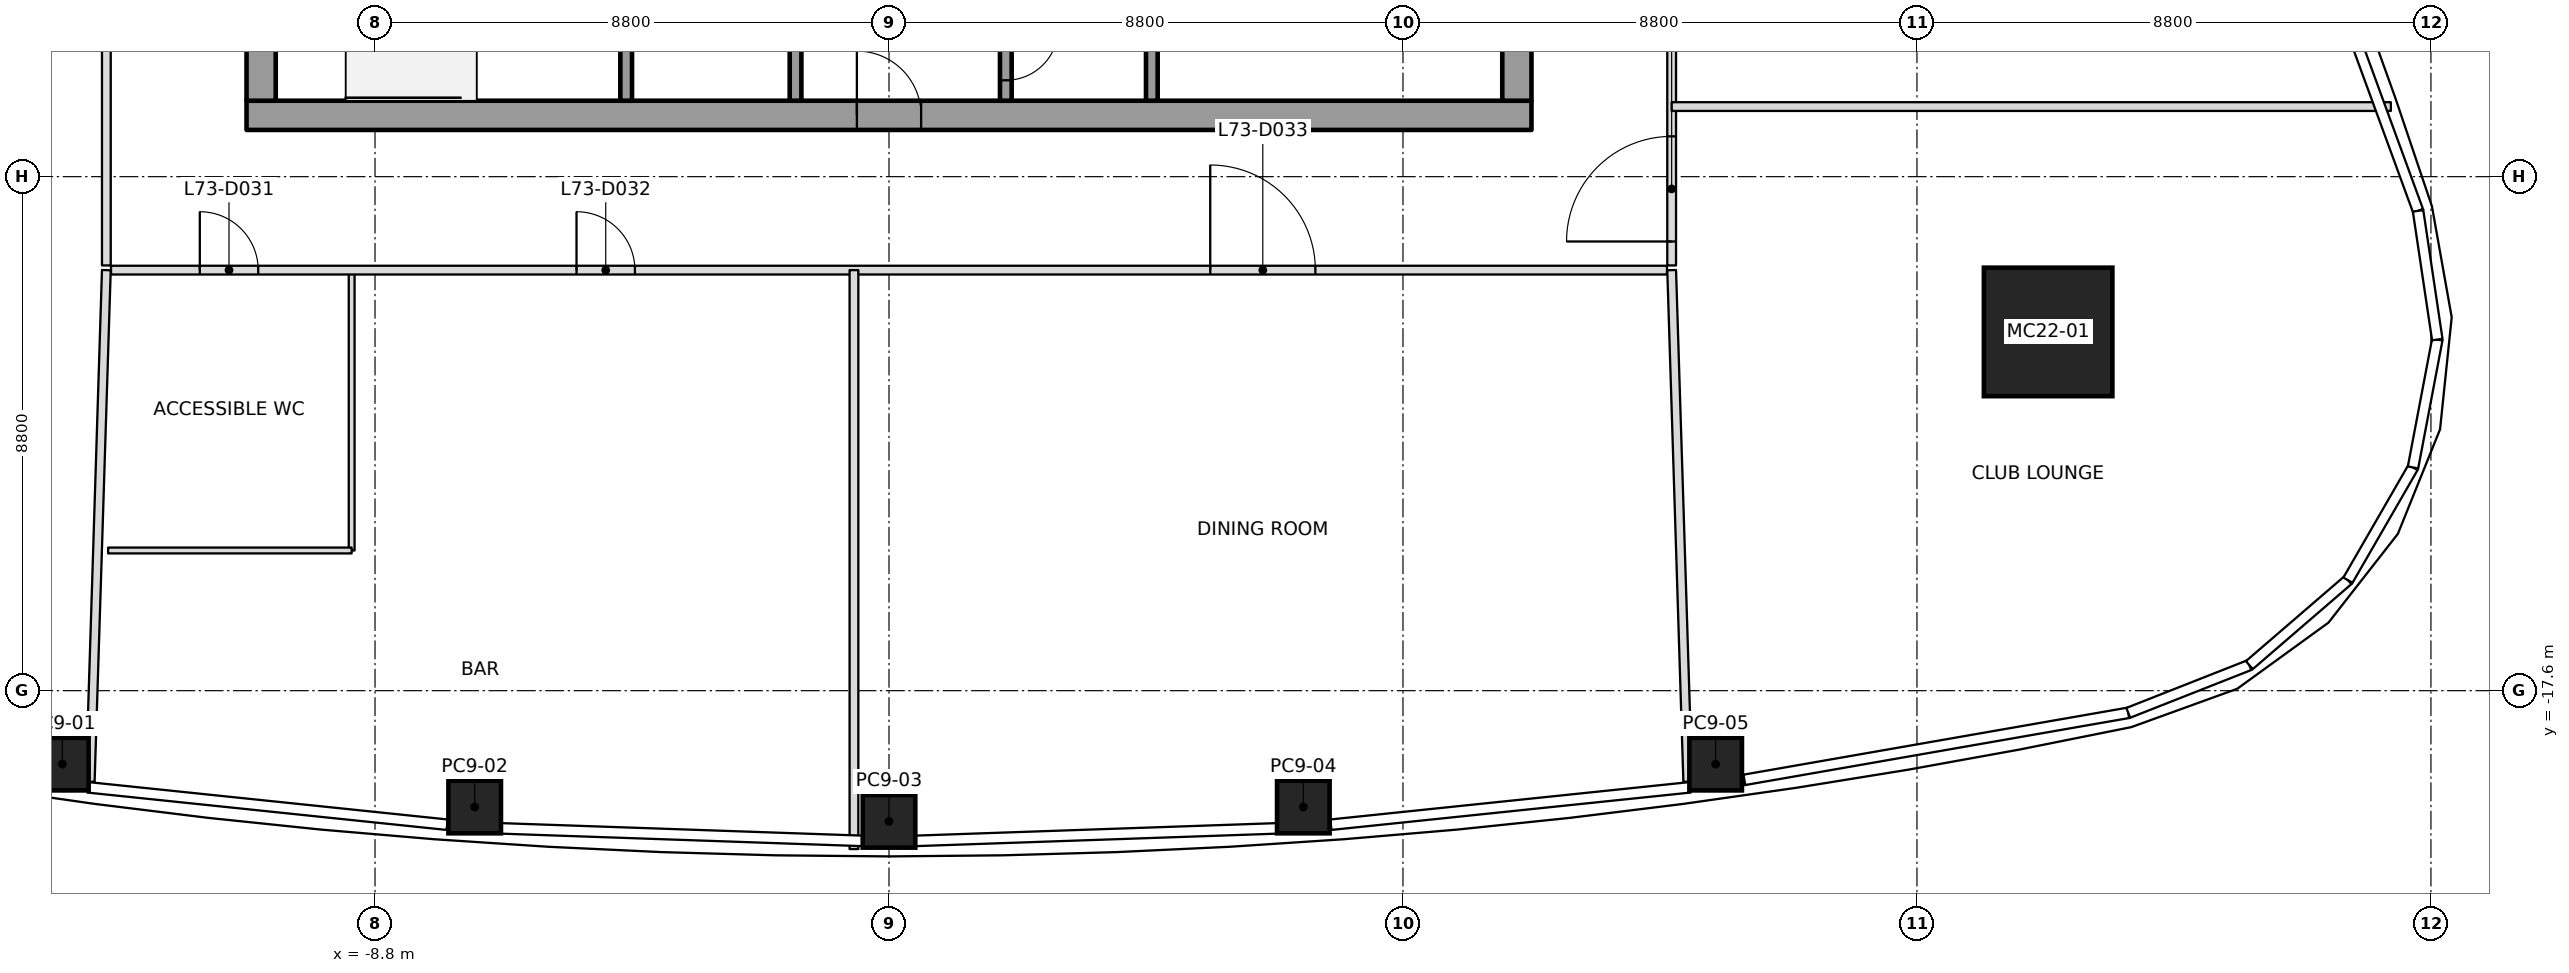
"""IFC4 building model, lengths in metres.
Left out: names, types, materials, properties, quantities, classifications, styles, units other than length and angle.
Written with IfcOpenShell. Run it as: python <this file> out.ifc"""

import sys

from ifc_helpers import new_model, si_unit, direction, frame, frame_2d, origin, origin_2d, place, context, subcontext, project, spatial, rectangle, extrude, clip, halfspace, element, fill, save


model = new_model("IFC4")
c1 = context("Model", 3, precision=1e-05, world=origin(), true_north=direction((0.0, 1.0)))
c2 = subcontext(c1, "Body", "Model", "MODEL_VIEW")
j1 = project(units=[si_unit("LENGTHUNIT", "METRE"), si_unit("PLANEANGLEUNIT", "RADIAN")], contexts=[c1])
p1 = place(None, origin())
s1 = spatial("IfcSite", under=j1, at=p1, CompositionType="ELEMENT")
p2 = place(p1, origin())
s2 = spatial("IfcBuilding", under=s1, at=p2, CompositionType="ELEMENT")
p3 = place(p2, frame((0.0, 0.0, 319.0)))
s3 = spatial("IfcBuildingStorey", under=s2, at=p3, CompositionType="ELEMENT", Elevation=319.0)
p4 = place(p3, frame((19.846, -11.458, 0.0), z_axis=(-0.020475326005, 0.011842241531, 0.999720222032), x_axis=(0.999790358538, 0.000242524599, 0.020473889636)))
e1 = element("IfcColumn", 1, at=p4, inside=s3, PredefinedType="COLUMN", context=c2, shape_type="SweptSolid", body=[
    clip(clip(extrude(rectangle(XDim=2.2, YDim=2.2, at=origin_2d()), origin(), (0.0, 0.0, 1.0), 5.401), halfspace(frame((0.0, 0.0, 0.007)), True)), halfspace(frame((0.0, 0.0, 5.4)), False)),
])
p5 = place(p3, frame((-14.154, -18.857, 0.0), z_axis=(0.012929182019, 0.007685178123, 0.999886880747), x_axis=(-0.990378637615, 0.137884644373, 0.01174644637)))
e2 = element("IfcColumn", 2, at=p5, inside=s3, PredefinedType="COLUMN", context=c2, shape_type="SweptSolid", body=[
    clip(clip(extrude(rectangle(XDim=0.9, YDim=0.9, at=origin_2d()), origin(), (0.0, 0.0, 1.0), 5.401), halfspace(frame((0.0, 0.0, 0.002)), True)), halfspace(frame((0.0, 0.0, 5.4)), False)),
])
p6 = place(p3, frame((-7.094, -19.592, 0.0), z_axis=(0.006464968382, 0.008228141577, 0.999945249436), x_axis=(-0.997591658129, 0.069110756598, 0.00588106743)))
e3 = element("IfcColumn", 3, at=p6, inside=s3, PredefinedType="COLUMN", context=c2, shape_type="SweptSolid", body=[
    clip(clip(extrude(rectangle(XDim=0.9, YDim=0.9, at=origin_2d()), origin(), (0.0, 0.0, 1.0), 5.4), halfspace(frame((0.0, 0.0, 0.001)), True)), halfspace(frame((0.0, 0.0, 5.4)), False)),
])
p7 = place(p3, frame((0.0, -19.837, 0.0), z_axis=(0.0, 0.008454350161, 0.999964261343), x_axis=(1.0, 0.0, 0.0)))
e4 = element("IfcColumn", 4, at=p7, inside=s3, PredefinedType="COLUMN", context=c2, shape_type="SweptSolid", body=[
    clip(extrude(rectangle(XDim=0.9, YDim=0.9, at=origin_2d()), origin(), (0.0, 0.0, 1.0), 5.4), halfspace(frame((0.0, 0.0, 0.001)), True)),
])
p8 = place(p3, frame((7.094, -19.592, 0.0), z_axis=(-0.006464968382, 0.008228141577, 0.999945249436), x_axis=(0.997591658129, 0.069110756598, 0.00588106743)))
e5 = element("IfcColumn", 5, at=p8, inside=s3, PredefinedType="COLUMN", context=c2, shape_type="SweptSolid", body=[
    clip(clip(extrude(rectangle(XDim=0.9, YDim=0.9, at=origin_2d()), origin(), (0.0, 0.0, 1.0), 5.4), halfspace(frame((0.0, 0.0, 0.001)), True)), halfspace(frame((0.0, 0.0, 5.4)), False)),
])
p9 = place(p3, frame((14.154, -18.857, 0.0), z_axis=(-0.012929182019, 0.007685178123, 0.999886880747), x_axis=(0.990378637615, 0.137884644373, 0.01174644637)))
e6 = element("IfcColumn", 6, at=p9, inside=s3, PredefinedType="COLUMN", context=c2, shape_type="SweptSolid", body=[
    clip(clip(extrude(rectangle(XDim=0.9, YDim=0.9, at=origin_2d()), origin(), (0.0, 0.0, 1.0), 5.401), halfspace(frame((0.0, 0.0, 0.002)), True)), halfspace(frame((0.0, 0.0, 5.4)), False)),
])
p10 = place(p3, frame((-11.0, -7.75, 0.0), z_axis=(0.0, 0.0, 1.0), x_axis=(1.0, 0.0, 0.0)))
e7 = element("IfcWall", 7, at=p10, inside=s3, PredefinedType="SHEAR", context=c2, shape_type="SweptSolid", body=[
    extrude(rectangle(XDim=22.0, YDim=0.5, at=frame_2d((11.0, 0.0))), origin(), (0.0, 0.0, 1.0), 5.4),
])
p11 = place(p10, frame((10.45, 0.0, 0.0)))
e8 = element("IfcOpeningElement", 8, at=p11, cuts=e7, PredefinedType="OPENING", context=c2, shape_type="SweptSolid", body=[
    extrude(rectangle(XDim=1.1, YDim=2.1, at=frame_2d((0.55, 1.05))), frame((0.0, 0.25, 0.0), z_axis=(0.0, -1.0, 0.0), x_axis=(1.0, 0.0, 0.0)), (0.0, 0.0, 1.0), 0.5),
])
p12 = place(p3, frame((-10.75, -7.5, 0.0), z_axis=(0.0, 0.0, 1.0), x_axis=(0.0, 1.0, 0.0)))
e9 = element("IfcWall", 9, at=p12, inside=s3, PredefinedType="SHEAR", context=c2, shape_type="SweptSolid", body=[
    extrude(rectangle(XDim=15.0, YDim=0.5, at=frame_2d((7.5, 0.0))), origin(), (0.0, 0.0, 1.0), 5.4),
])
p13 = place(p12, frame((6.6, 0.0, 0.0)))
e10 = element("IfcOpeningElement", 10, at=p13, cuts=e9, PredefinedType="OPENING", context=c2, shape_type="SweptSolid", body=[
    extrude(rectangle(XDim=1.8, YDim=2.1, at=frame_2d((0.9, 1.05))), frame((0.0, 0.25, 0.0), z_axis=(0.0, -1.0, 0.0), x_axis=(1.0, 0.0, 0.0)), (0.0, 0.0, 1.0), 0.5),
])
p14 = place(p3, frame((10.75, -7.5, 0.0), z_axis=(0.0, 0.0, 1.0), x_axis=(0.0, 1.0, 0.0)))
e11 = element("IfcWall", 11, at=p14, inside=s3, PredefinedType="SHEAR", context=c2, shape_type="SweptSolid", body=[
    extrude(rectangle(XDim=15.0, YDim=0.5, at=frame_2d((7.5, 0.0))), origin(), (0.0, 0.0, 1.0), 5.4),
])
p15 = place(p14, frame((6.6, 0.0, 0.0)))
e12 = element("IfcOpeningElement", 12, at=p15, cuts=e11, PredefinedType="OPENING", context=c2, shape_type="SweptSolid", body=[
    extrude(rectangle(XDim=1.8, YDim=2.1, at=frame_2d((0.9, 1.05))), frame((0.0, 0.25, 0.0), z_axis=(0.0, -1.0, 0.0), x_axis=(1.0, 0.0, 0.0)), (0.0, 0.0, 1.0), 0.5),
])
p16 = place(p3, frame((-4.5, -4.6, 0.0), z_axis=(0.0, 0.0, 1.0), x_axis=(0.0, -1.0, 0.0)))
e13 = element("IfcWall", 13, at=p16, inside=s3, PredefinedType="SOLIDWALL", context=c2, shape_type="SweptSolid", body=[
    extrude(rectangle(XDim=2.9, YDim=0.2, at=frame_2d((1.45, 0.0))), origin(), (0.0, 0.0, 1.0), 5.25),
])
p17 = place(p3, frame((-1.6, -7.5, 0.0), z_axis=(0.0, 0.0, 1.0), x_axis=(0.0, 1.0, 0.0)))
e14 = element("IfcWall", 14, at=p17, inside=s3, PredefinedType="SOLIDWALL", context=c2, shape_type="SweptSolid", body=[
    extrude(rectangle(XDim=2.9, YDim=0.2, at=frame_2d((1.45, 0.0))), origin(), (0.0, 0.0, 1.0), 5.25),
])
p18 = place(p17, frame((0.9, 0.0, 0.0)))
e15 = element("IfcOpeningElement", 15, at=p18, cuts=e14, PredefinedType="OPENING", context=c2, shape_type="SweptSolid", body=[
    extrude(rectangle(XDim=1.1, YDim=2.1, at=frame_2d((0.55, 1.05))), frame((0.0, 0.1, 0.0), z_axis=(0.0, -1.0, 0.0), x_axis=(1.0, 0.0, 0.0)), (0.0, 0.0, 1.0), 0.2),
])
p19 = place(p3, frame((2.0, -5.9, 0.0), z_axis=(0.0, 0.0, 1.0), x_axis=(0.0, -1.0, 0.0)))
e16 = element("IfcWall", 16, at=p19, inside=s3, PredefinedType="SOLIDWALL", context=c2, shape_type="SweptSolid", body=[
    extrude(rectangle(XDim=1.6, YDim=0.2, at=frame_2d((0.8, 0.0))), origin(), (0.0, 0.0, 1.0), 5.25),
])
p20 = place(p19, frame((0.35, 0.0, 0.0)))
e17 = element("IfcOpeningElement", 17, at=p20, cuts=e16, PredefinedType="OPENING", context=c2, shape_type="SweptSolid", body=[
    extrude(rectangle(XDim=0.9, YDim=2.1, at=frame_2d((0.45, 1.05))), frame((0.0, 0.1, 0.0), z_axis=(0.0, -1.0, 0.0), x_axis=(1.0, 0.0, 0.0)), (0.0, 0.0, 1.0), 0.2),
])
p21 = place(p3, frame((4.5, -5.9, 0.0), z_axis=(0.0, 0.0, 1.0), x_axis=(0.0, -1.0, 0.0)))
e18 = element("IfcWall", 18, at=p21, inside=s3, PredefinedType="SOLIDWALL", context=c2, shape_type="SweptSolid", body=[
    extrude(rectangle(XDim=1.6, YDim=0.2, at=frame_2d((0.8, 0.0))), origin(), (0.0, 0.0, 1.0), 5.25),
])
p22 = place(p3, frame((-13.4, -10.4, 0.0), z_axis=(0.0, 0.0, 1.0), x_axis=(-0.031481767442, -0.999504326313, 0.0)))
e19 = element("IfcWall", 19, at=p22, inside=s3, PredefinedType="PARTITIONING", context=c2, shape_type="SweptSolid", body=[
    extrude(rectangle(XDim=8.763, YDim=0.15, at=frame_2d((4.382, 0.0))), origin(), (0.0, 0.0, 1.0), 4.533),
])
p23 = place(p3, frame((-0.6, -10.4, 0.0), z_axis=(0.0, 0.0, 1.0), x_axis=(0.0, -1.0, 0.0)))
e20 = element("IfcWall", 20, at=p23, inside=s3, PredefinedType="PARTITIONING", context=c2, shape_type="SweptSolid", body=[
    extrude(rectangle(XDim=9.912, YDim=0.15, at=frame_2d((4.956, 0.0))), origin(), (0.0, 0.0, 1.0), 4.533),
])
p24 = place(p3, frame((13.4, -10.4, 0.0), z_axis=(0.0, 0.0, 1.0), x_axis=(0.031481767442, -0.999504326313, 0.0)))
e21 = element("IfcWall", 21, at=p24, inside=s3, PredefinedType="PARTITIONING", context=c2, shape_type="SweptSolid", body=[
    extrude(rectangle(XDim=8.763, YDim=0.15, at=frame_2d((4.382, 0.0))), origin(), (0.0, 0.0, 1.0), 4.533),
])
p25 = place(p3, frame((13.4, -7.6, 0.0), z_axis=(0.0, 0.0, 1.0), x_axis=(1.0, 0.0, 0.0)))
e22 = element("IfcWall", 22, at=p25, inside=s3, PredefinedType="PARTITIONING", context=c2, shape_type="SweptSolid", body=[
    extrude(rectangle(XDim=12.314, YDim=0.15, at=frame_2d((6.157, 0.0))), origin(), (0.0, 0.0, 1.0), 4.533),
])
p26 = place(p3, frame((-13.4, 10.32, 0.0), z_axis=(0.0, 0.0, 1.0), x_axis=(0.0, -1.0, 0.0)))
e23 = element("IfcWall", 23, at=p26, inside=s3, PredefinedType="PARTITIONING", context=c2, shape_type="SweptSolid", body=[
    extrude(rectangle(XDim=20.64, YDim=0.15, at=frame_2d((10.32, 0.0))), origin(), (0.0, 0.0, 1.0), 4.538),
])
p27 = place(p26, frame((9.83, 0.0, 0.0)))
e24 = element("IfcOpeningElement", 24, at=p27, cuts=e23, PredefinedType="OPENING", context=c2, shape_type="SweptSolid", body=[
    extrude(rectangle(XDim=1.0, YDim=2.1, at=frame_2d((0.5, 1.05))), frame((0.0, 0.075, 0.0), z_axis=(0.0, -1.0, 0.0), x_axis=(1.0, 0.0, 0.0)), (0.0, 0.0, 1.0), 0.15),
])
p28 = place(p3, frame((-13.32, -10.4, 0.0), z_axis=(0.0, 0.0, 1.0), x_axis=(1.0, 0.0, 0.0)))
e25 = element("IfcWall", 25, at=p28, inside=s3, PredefinedType="PARTITIONING", context=c2, shape_type="SweptSolid", body=[
    extrude(rectangle(XDim=26.64, YDim=0.15, at=frame_2d((13.32, 0.0))), origin(), (0.0, 0.0, 1.0), 4.606),
])
p29 = place(p28, frame((1.52, 0.0, 0.0)))
e26 = element("IfcOpeningElement", 26, at=p29, cuts=e25, PredefinedType="OPENING", context=c2, shape_type="SweptSolid", body=[
    extrude(rectangle(XDim=1.0, YDim=2.1, at=frame_2d((0.5, 1.05))), frame((0.0, 0.075, 0.0), z_axis=(0.0, -1.0, 0.0), x_axis=(1.0, 0.0, 0.0)), (0.0, 0.0, 1.0), 0.15),
])
p30 = place(p28, frame((7.97, 0.0, 0.0)))
e27 = element("IfcOpeningElement", 27, at=p30, cuts=e25, PredefinedType="OPENING", context=c2, shape_type="SweptSolid", body=[
    extrude(rectangle(XDim=1.0, YDim=2.1, at=frame_2d((0.5, 1.05))), frame((0.0, 0.075, 0.0), z_axis=(0.0, -1.0, 0.0), x_axis=(1.0, 0.0, 0.0)), (0.0, 0.0, 1.0), 0.15),
])
p31 = place(p28, frame((18.82, 0.0, 0.0)))
e28 = element("IfcOpeningElement", 28, at=p31, cuts=e25, PredefinedType="OPENING", context=c2, shape_type="SweptSolid", body=[
    extrude(rectangle(XDim=1.8, YDim=2.1, at=frame_2d((0.9, 1.05))), frame((0.0, 0.075, 0.0), z_axis=(0.0, -1.0, 0.0), x_axis=(1.0, 0.0, 0.0)), (0.0, 0.0, 1.0), 0.15),
])
p32 = place(p3, frame((13.4, -10.32, 0.0), z_axis=(0.0, 0.0, 1.0), x_axis=(0.0, 1.0, 0.0)))
e29 = element("IfcWall", 29, at=p32, inside=s3, PredefinedType="PARTITIONING", context=c2, shape_type="SweptSolid", body=[
    extrude(rectangle(XDim=20.64, YDim=0.15, at=frame_2d((10.32, 0.0))), origin(), (0.0, 0.0, 1.0), 4.538),
])
p33 = place(p32, frame((0.41, 0.0, 0.0)))
e30 = element("IfcOpeningElement", 30, at=p33, cuts=e29, PredefinedType="OPENING", context=c2, shape_type="SweptSolid", body=[
    extrude(rectangle(XDim=1.8, YDim=2.1, at=frame_2d((0.9, 1.05))), frame((0.0, 0.075, 0.0), z_axis=(0.0, -1.0, 0.0), x_axis=(1.0, 0.0, 0.0)), (0.0, 0.0, 1.0), 0.15),
])
p34 = place(p32, frame((10.82, 0.0, 0.0)))
e31 = element("IfcOpeningElement", 31, at=p34, cuts=e29, PredefinedType="OPENING", context=c2, shape_type="SweptSolid", body=[
    extrude(rectangle(XDim=1.8, YDim=2.1, at=frame_2d((0.9, 1.05))), frame((0.0, 0.075, 0.0), z_axis=(0.0, -1.0, 0.0), x_axis=(1.0, 0.0, 0.0)), (0.0, 0.0, 1.0), 0.15),
])
p35 = place(p3, frame((-9.2, -10.43, 0.0), z_axis=(0.0, 0.0, 1.0), x_axis=(0.0, -1.0, 0.0)))
e32 = element("IfcWall", 32, at=p35, inside=s3, PredefinedType="PARTITIONING", context=c2, shape_type="SweptSolid", body=[
    extrude(rectangle(XDim=4.77, YDim=0.1, at=frame_2d((2.385, 0.0))), origin(), (0.0, 0.0, 1.0), 4.75),
])
p36 = place(p3, frame((-9.2, -15.2, 0.0), z_axis=(0.0, 0.0, 1.0), x_axis=(-1.0, 0.0, 0.0)))
e33 = element("IfcWall", 33, at=p36, inside=s3, PredefinedType="PARTITIONING", context=c2, shape_type="SweptSolid", body=[
    extrude(rectangle(XDim=4.17, YDim=0.1, at=frame_2d((2.085, 0.0))), origin(), (0.0, 0.0, 1.0), 4.606),
])
p37 = place(p29, origin())
e34 = element("IfcDoor", 34, at=p37, inside=s3, OperationType="SINGLE_SWING_LEFT", PredefinedType="DOOR", context=c2, shape_type="SweptSolid", body=[
    extrude(rectangle(XDim=1.0, YDim=2.1, at=frame_2d((0.5, 1.05))), frame((0.0, 0.025, 0.0), z_axis=(0.0, -1.0, 0.0), x_axis=(1.0, 0.0, 0.0)), (0.0, 0.0, 1.0), 0.05),
])
fill(e26, e34)
p38 = place(p30, origin())
e35 = element("IfcDoor", 35, at=p38, inside=s3, OperationType="SINGLE_SWING_LEFT", PredefinedType="DOOR", context=c2, shape_type="SweptSolid", body=[
    extrude(rectangle(XDim=1.0, YDim=2.1, at=frame_2d((0.5, 1.05))), frame((0.0, 0.025, 0.0), z_axis=(0.0, -1.0, 0.0), x_axis=(1.0, 0.0, 0.0)), (0.0, 0.0, 1.0), 0.05),
])
fill(e27, e35)
p39 = place(p31, origin())
e36 = element("IfcDoor", 36, at=p39, inside=s3, OperationType="DOUBLE_DOOR_SINGLE_SWING", PredefinedType="DOOR", context=c2, shape_type="SweptSolid", body=[
    extrude(rectangle(XDim=1.8, YDim=2.1, at=frame_2d((0.9, 1.05))), frame((0.0, 0.025, 0.0), z_axis=(0.0, -1.0, 0.0), x_axis=(1.0, 0.0, 0.0)), (0.0, 0.0, 1.0), 0.05),
])
fill(e28, e36)
p40 = place(p33, origin())
e37 = element("IfcDoor", 37, at=p40, inside=s3, OperationType="DOUBLE_DOOR_SINGLE_SWING", PredefinedType="DOOR", context=c2, shape_type="SweptSolid", body=[
    extrude(rectangle(XDim=1.8, YDim=2.1, at=frame_2d((0.9, 1.05))), frame((0.0, 0.025, 0.0), z_axis=(0.0, -1.0, 0.0), x_axis=(1.0, 0.0, 0.0)), (0.0, 0.0, 1.0), 0.05),
])
fill(e30, e37)
p41 = place(p20, origin())
e38 = element("IfcDoor", 38, at=p41, inside=s3, OperationType="SINGLE_SWING_RIGHT", PredefinedType="DOOR", context=c2, shape_type="SweptSolid", body=[
    extrude(rectangle(XDim=0.9, YDim=2.1, at=frame_2d((0.45, 1.05))), frame((0.0, 0.025, 0.0), z_axis=(0.0, -1.0, 0.0), x_axis=(1.0, 0.0, 0.0)), (0.0, 0.0, 1.0), 0.05),
])
fill(e17, e38)
p42 = place(p11, origin())
e39 = element("IfcDoor", 39, at=p42, inside=s3, OperationType="SINGLE_SWING_RIGHT", PredefinedType="DOOR", context=c2, shape_type="SweptSolid", body=[
    extrude(rectangle(XDim=1.1, YDim=2.1, at=frame_2d((0.55, 1.05))), frame((0.0, 0.025, 0.0), z_axis=(0.0, -1.0, 0.0), x_axis=(1.0, 0.0, 0.0)), (0.0, 0.0, 1.0), 0.05),
])
fill(e8, e39)
save(model, sys.argv[1])
